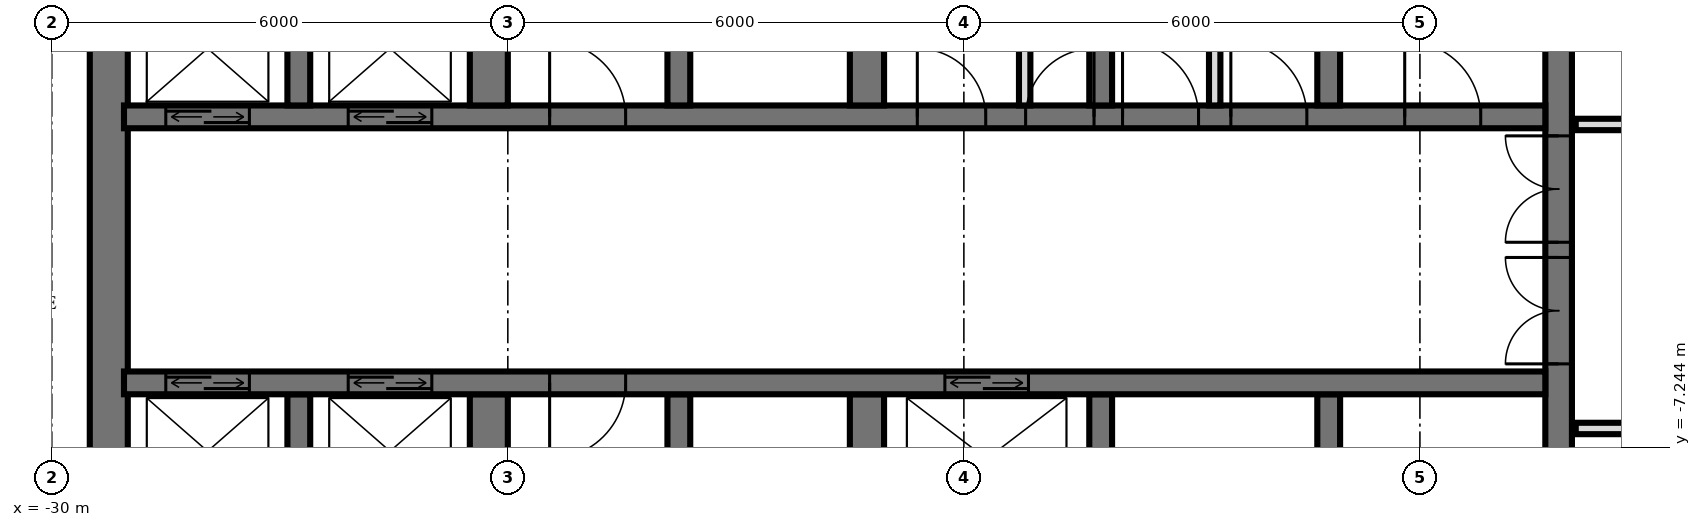
"""IFC4 building model, lengths in metres.
Left out: names, types, materials, properties, quantities, classifications, styles, units other than length and angle.
Written with IfcOpenShell. Run it as: python <this file> out.ifc"""

import sys

from ifc_helpers import new_model, si_unit, direction, frame, frame_2d, origin, place, context, subcontext, project, spatial, rectangle, extrude, element, fill, save


model = new_model("IFC4")
c1 = context("Model", 3, precision=1e-05, world=origin(), true_north=direction((0.0, 1.0)))
c2 = subcontext(c1, "Body", "Model", "MODEL_VIEW")
j1 = project(units=[si_unit("LENGTHUNIT", "METRE"), si_unit("PLANEANGLEUNIT", "RADIAN")], contexts=[c1])
p1 = place(None, origin())
s1 = spatial("IfcSite", under=j1, at=p1, CompositionType="ELEMENT")
p2 = place(p1, origin())
s2 = spatial("IfcBuilding", under=s1, at=p2, CompositionType="ELEMENT")
p3 = place(p2, frame((0.0, 0.0, 38.4)))
s3 = spatial("IfcBuildingStorey", under=s2, at=p3, CompositionType="ELEMENT", Elevation=38.4)
p4 = place(p3, frame((-10.175, -14.55, 0.0), z_axis=(0.0, 0.0, 1.0), x_axis=(0.0, 1.0, 0.0)))
e1 = element("IfcWall", 1, at=p4, inside=s3, PredefinedType="SHEAR", context=c2, shape_type="SweptSolid", body=[
    extrude(rectangle(XDim=14.1, YDim=0.35, at=frame_2d((7.05, 0.0))), origin(), (0.0, 0.0, 1.0), 3.6),
])
p5 = place(p4, frame((8.4, 0.0, 0.0)))
e2 = element("IfcOpeningElement", 2, at=p5, cuts=e1, PredefinedType="OPENING", context=c2, shape_type="SweptSolid", body=[
    extrude(rectangle(XDim=1.4, YDim=2.4, at=frame_2d((0.7, 1.2))), frame((0.0, 0.185, 0.0), z_axis=(0.0, -1.0, 0.0), x_axis=(1.0, 0.0, 0.0)), (0.0, 0.0, 1.0), 0.37),
])
p6 = place(p4, frame((10.0, 0.0, 0.0)))
e3 = element("IfcOpeningElement", 3, at=p6, cuts=e1, PredefinedType="OPENING", context=c2, shape_type="SweptSolid", body=[
    extrude(rectangle(XDim=1.4, YDim=2.4, at=frame_2d((0.7, 1.2))), frame((0.0, 0.185, 0.0), z_axis=(0.0, -1.0, 0.0), x_axis=(1.0, 0.0, 0.0)), (0.0, 0.0, 1.0), 0.37),
])
p7 = place(p4, frame((4.0, 0.0, 0.0)))
e4 = element("IfcOpeningElement", 4, at=p7, cuts=e1, PredefinedType="OPENING", context=c2, shape_type="SweptSolid", body=[
    extrude(rectangle(XDim=1.2, YDim=2.1, at=frame_2d((0.6, 1.05))), frame((0.0, 0.185, 0.0), z_axis=(0.0, -1.0, 0.0), x_axis=(1.0, 0.0, 0.0)), (0.0, 0.0, 1.0), 0.37),
])
p8 = place(p3, frame((-29.25, -14.55, 0.0), z_axis=(0.0, 0.0, 1.0), x_axis=(0.0, 1.0, 0.0)))
e5 = element("IfcWall", 5, at=p8, inside=s3, PredefinedType="SHEAR", context=c2, shape_type="SweptSolid", body=[
    extrude(rectangle(XDim=14.1, YDim=0.5, at=frame_2d((7.05, 0.0))), origin(), (0.0, 0.0, 1.0), 3.6),
])
p9 = place(p3, frame((-29.05, -2.9, 0.0), z_axis=(0.0, 0.0, 1.0), x_axis=(1.0, 0.0, 0.0)))
e6 = element("IfcWall", 6, at=p9, inside=s3, PredefinedType="SHEAR", context=c2, shape_type="SweptSolid", body=[
    extrude(rectangle(XDim=18.7, YDim=0.3, at=frame_2d((9.35, 0.0))), origin(), (0.0, 0.0, 1.0), 3.6),
])
p10 = place(p9, frame((2.95, 0.0, 0.0)))
e7 = element("IfcOpeningElement", 7, at=p10, cuts=e6, PredefinedType="OPENING", context=c2, shape_type="SweptSolid", body=[
    extrude(rectangle(XDim=1.1, YDim=2.1, at=frame_2d((0.55, 1.05))), frame((0.0, 0.16, 0.0), z_axis=(0.0, -1.0, 0.0), x_axis=(1.0, 0.0, 0.0)), (0.0, 0.0, 1.0), 0.32),
])
p11 = place(p9, frame((0.55, 0.0, 0.0)))
e8 = element("IfcOpeningElement", 8, at=p11, cuts=e6, PredefinedType="OPENING", context=c2, shape_type="SweptSolid", body=[
    extrude(rectangle(XDim=1.1, YDim=2.1, at=frame_2d((0.55, 1.05))), frame((0.0, 0.16, 0.0), z_axis=(0.0, -1.0, 0.0), x_axis=(1.0, 0.0, 0.0)), (0.0, 0.0, 1.0), 0.32),
])
p12 = place(p9, frame((11.863, 0.0, 0.0)))
e9 = element("IfcOpeningElement", 9, at=p12, cuts=e6, PredefinedType="OPENING", context=c2, shape_type="SweptSolid", body=[
    extrude(rectangle(XDim=0.9, YDim=2.1, at=frame_2d((0.45, 1.05))), frame((0.0, 0.16, 0.0), z_axis=(0.0, -1.0, 0.0), x_axis=(1.0, 0.0, 0.0)), (0.0, 0.0, 1.0), 0.32),
])
p13 = place(p9, frame((10.438, 0.0, 0.0)))
e10 = element("IfcOpeningElement", 10, at=p13, cuts=e6, PredefinedType="OPENING", context=c2, shape_type="SweptSolid", body=[
    extrude(rectangle(XDim=0.9, YDim=2.1, at=frame_2d((0.45, 1.05))), frame((0.0, 0.16, 0.0), z_axis=(0.0, -1.0, 0.0), x_axis=(1.0, 0.0, 0.0)), (0.0, 0.0, 1.0), 0.32),
])
p14 = place(p9, frame((16.85, 0.0, 0.0)))
e11 = element("IfcOpeningElement", 11, at=p14, cuts=e6, PredefinedType="OPENING", context=c2, shape_type="SweptSolid", body=[
    extrude(rectangle(XDim=1.0, YDim=2.1, at=frame_2d((0.5, 1.05))), frame((0.0, 0.16, 0.0), z_axis=(0.0, -1.0, 0.0), x_axis=(1.0, 0.0, 0.0)), (0.0, 0.0, 1.0), 0.32),
])
p15 = place(p9, frame((14.562, 0.0, 0.0)))
e12 = element("IfcOpeningElement", 12, at=p15, cuts=e6, PredefinedType="OPENING", context=c2, shape_type="SweptSolid", body=[
    extrude(rectangle(XDim=1.0, YDim=2.1, at=frame_2d((0.5, 1.05))), frame((0.0, 0.16, 0.0), z_axis=(0.0, -1.0, 0.0), x_axis=(1.0, 0.0, 0.0)), (0.0, 0.0, 1.0), 0.32),
])
p16 = place(p9, frame((13.137, 0.0, 0.0)))
e13 = element("IfcOpeningElement", 13, at=p16, cuts=e6, PredefinedType="OPENING", context=c2, shape_type="SweptSolid", body=[
    extrude(rectangle(XDim=1.0, YDim=2.1, at=frame_2d((0.5, 1.05))), frame((0.0, 0.16, 0.0), z_axis=(0.0, -1.0, 0.0), x_axis=(1.0, 0.0, 0.0)), (0.0, 0.0, 1.0), 0.32),
])
p17 = place(p9, frame((5.6, 0.0, 0.0)))
e14 = element("IfcOpeningElement", 14, at=p17, cuts=e6, PredefinedType="OPENING", context=c2, shape_type="SweptSolid", body=[
    extrude(rectangle(XDim=1.0, YDim=2.1, at=frame_2d((0.5, 1.05))), frame((0.0, 0.16, 0.0), z_axis=(0.0, -1.0, 0.0), x_axis=(1.0, 0.0, 0.0)), (0.0, 0.0, 1.0), 0.32),
])
p18 = place(p3, frame((-29.05, -6.4, 0.0), z_axis=(0.0, 0.0, 1.0), x_axis=(1.0, 0.0, 0.0)))
e15 = element("IfcWall", 15, at=p18, inside=s3, PredefinedType="SHEAR", context=c2, shape_type="SweptSolid", body=[
    extrude(rectangle(XDim=18.7, YDim=0.3, at=frame_2d((9.35, 0.0))), origin(), (0.0, 0.0, 1.0), 3.6),
])
p19 = place(p18, frame((2.95, 0.0, 0.0)))
e16 = element("IfcOpeningElement", 16, at=p19, cuts=e15, PredefinedType="OPENING", context=c2, shape_type="SweptSolid", body=[
    extrude(rectangle(XDim=1.1, YDim=2.1, at=frame_2d((0.55, 1.05))), frame((0.0, 0.16, 0.0), z_axis=(0.0, -1.0, 0.0), x_axis=(1.0, 0.0, 0.0)), (0.0, 0.0, 1.0), 0.32),
])
p20 = place(p18, frame((0.55, 0.0, 0.0)))
e17 = element("IfcOpeningElement", 17, at=p20, cuts=e15, PredefinedType="OPENING", context=c2, shape_type="SweptSolid", body=[
    extrude(rectangle(XDim=1.1, YDim=2.1, at=frame_2d((0.55, 1.05))), frame((0.0, 0.16, 0.0), z_axis=(0.0, -1.0, 0.0), x_axis=(1.0, 0.0, 0.0)), (0.0, 0.0, 1.0), 0.32),
])
p21 = place(p18, frame((10.8, 0.0, 0.0)))
e18 = element("IfcOpeningElement", 18, at=p21, cuts=e15, PredefinedType="OPENING", context=c2, shape_type="SweptSolid", body=[
    extrude(rectangle(XDim=1.1, YDim=2.1, at=frame_2d((0.55, 1.05))), frame((0.0, 0.16, 0.0), z_axis=(0.0, -1.0, 0.0), x_axis=(1.0, 0.0, 0.0)), (0.0, 0.0, 1.0), 0.32),
])
p22 = place(p18, frame((5.6, 0.0, 0.0)))
e19 = element("IfcOpeningElement", 19, at=p22, cuts=e15, PredefinedType="OPENING", context=c2, shape_type="SweptSolid", body=[
    extrude(rectangle(XDim=1.0, YDim=2.1, at=frame_2d((0.5, 1.05))), frame((0.0, 0.16, 0.0), z_axis=(0.0, -1.0, 0.0), x_axis=(1.0, 0.0, 0.0)), (0.0, 0.0, 1.0), 0.32),
])
for number, where, z_axis, x_axis in (
    (20, (-13.2, -2.75, 0.0), (0.0, 0.0, 1.0), (0.0, 1.0, 0.0)),
    (21, (-13.2, -8.85, 0.0), (0.0, 0.0, 1.0), (0.0, 1.0, 0.0)),
    (22, (-16.2, -2.75, 0.0), (0.0, 0.0, 1.0), (0.0, 1.0, 0.0)),
    (23, (-16.2, -8.85, 0.0), (0.0, 0.0, 1.0), (0.0, 1.0, 0.0)),
):
    element("IfcWall", number, at=place(p3, frame(where, z_axis=z_axis, x_axis=x_axis)), inside=s3, PredefinedType="SHEAR", context=c2, shape_type="SweptSolid", body=[
        extrude(rectangle(XDim=2.3, YDim=0.3, at=frame_2d((1.15, 0.0))), origin(), (0.0, 0.0, 1.0), 3.6),
    ])
for number, where, z_axis, x_axis in (
    (24, (-19.275, -2.75, 0.0), (0.0, 0.0, 1.0), (0.0, 1.0, 0.0)),
    (25, (-19.275, -8.85, 0.0), (0.0, 0.0, 1.0), (0.0, 1.0, 0.0)),
):
    element("IfcWall", number, at=place(p3, frame(where, z_axis=z_axis, x_axis=x_axis)), inside=s3, PredefinedType="SHEAR", context=c2, shape_type="SweptSolid", body=[
        extrude(rectangle(XDim=2.3, YDim=0.45, at=frame_2d((1.15, 0.0))), origin(), (0.0, 0.0, 1.0), 3.6),
    ])
for number, where, z_axis, x_axis in (
    (26, (-21.75, -2.75, 0.0), (0.0, 0.0, 1.0), (0.0, 1.0, 0.0)),
    (27, (-21.75, -8.85, 0.0), (0.0, 0.0, 1.0), (0.0, 1.0, 0.0)),
):
    element("IfcWall", number, at=place(p3, frame(where, z_axis=z_axis, x_axis=x_axis)), inside=s3, PredefinedType="SHEAR", context=c2, shape_type="SweptSolid", body=[
        extrude(rectangle(XDim=2.3, YDim=0.3, at=frame_2d((1.15, 0.0))), origin(), (0.0, 0.0, 1.0), 3.6),
    ])
for number, where, z_axis, x_axis in (
    (28, (-24.25, -2.75, 0.0), (0.0, 0.0, 1.0), (0.0, 1.0, 0.0)),
    (29, (-24.25, -8.85, 0.0), (0.0, 0.0, 1.0), (0.0, 1.0, 0.0)),
):
    element("IfcWall", number, at=place(p3, frame(where, z_axis=z_axis, x_axis=x_axis)), inside=s3, PredefinedType="SHEAR", context=c2, shape_type="SweptSolid", body=[
        extrude(rectangle(XDim=2.3, YDim=0.5, at=frame_2d((1.15, 0.0))), origin(), (0.0, 0.0, 1.0), 3.6),
    ])
for number, where, z_axis, x_axis in (
    (30, (-26.75, -2.75, 0.0), (0.0, 0.0, 1.0), (0.0, 1.0, 0.0)),
    (31, (-26.75, -8.85, 0.0), (0.0, 0.0, 1.0), (0.0, 1.0, 0.0)),
):
    element("IfcWall", number, at=place(p3, frame(where, z_axis=z_axis, x_axis=x_axis)), inside=s3, PredefinedType="SHEAR", context=c2, shape_type="SweptSolid", body=[
        extrude(rectangle(XDim=2.3, YDim=0.3, at=frame_2d((1.15, 0.0))), origin(), (0.0, 0.0, 1.0), 3.6),
    ])
for number, where, z_axis, x_axis in (
    (32, (-17.2, -2.75, 0.0), (0.0, 0.0, 1.0), (0.0, 1.0, 0.0)),
    (33, (-14.7, -2.75, 0.0), (0.0, 0.0, 1.0), (0.0, 1.0, 0.0)),
):
    element("IfcWall", number, at=place(p3, frame(where, z_axis=z_axis, x_axis=x_axis)), inside=s3, PredefinedType="PARTITIONING", context=c2, shape_type="SweptSolid", body=[
        extrude(rectangle(XDim=2.3, YDim=0.15, at=frame_2d((1.15, 0.0))), origin(), (0.0, 0.0, 1.0), 3.3),
    ])
p23 = place(p3, frame((-9.95, -7.0, 0.0), z_axis=(0.0, 0.0, 1.0), x_axis=(1.0, 0.0, 0.0)))
e34 = element("IfcWall", 34, at=p23, inside=s3, PredefinedType="PARTITIONING", context=c2, shape_type="SweptSolid", body=[
    extrude(rectangle(XDim=19.9, YDim=0.15, at=frame_2d((9.95, 0.0))), origin(), (0.0, 0.0, 1.0), 3.32),
])
p24 = place(p23, frame((9.45, 0.0, 0.0)))
e35 = element("IfcOpeningElement", 35, at=p24, cuts=e34, PredefinedType="OPENING", context=c2, shape_type="SweptSolid", body=[
    extrude(rectangle(XDim=1.0, YDim=2.1, at=frame_2d((0.5, 1.05))), frame((0.0, 0.085, 0.0), z_axis=(0.0, -1.0, 0.0), x_axis=(1.0, 0.0, 0.0)), (0.0, 0.0, 1.0), 0.17),
])
p25 = place(p23, frame((15.45, 0.0, 0.0)))
e36 = element("IfcOpeningElement", 36, at=p25, cuts=e34, PredefinedType="OPENING", context=c2, shape_type="SweptSolid", body=[
    extrude(rectangle(XDim=1.0, YDim=2.1, at=frame_2d((0.5, 1.05))), frame((0.0, 0.085, 0.0), z_axis=(0.0, -1.0, 0.0), x_axis=(1.0, 0.0, 0.0)), (0.0, 0.0, 1.0), 0.17),
])
p26 = place(p3, frame((-9.95, -3.0, 0.0), z_axis=(0.0, 0.0, 1.0), x_axis=(1.0, 0.0, 0.0)))
e37 = element("IfcWall", 37, at=p26, inside=s3, PredefinedType="PARTITIONING", context=c2, shape_type="SweptSolid", body=[
    extrude(rectangle(XDim=19.9, YDim=0.15, at=frame_2d((9.95, 0.0))), origin(), (0.0, 0.0, 1.0), 3.32),
])
p27 = place(p26, frame((1.7, 0.0, 0.0)))
e38 = element("IfcOpeningElement", 38, at=p27, cuts=e37, PredefinedType="OPENING", context=c2, shape_type="SweptSolid", body=[
    extrude(rectangle(XDim=1.0, YDim=2.1, at=frame_2d((0.5, 1.05))), frame((0.0, 0.085, 0.0), z_axis=(0.0, -1.0, 0.0), x_axis=(1.0, 0.0, 0.0)), (0.0, 0.0, 1.0), 0.17),
])
p28 = place(p26, frame((5.45, 0.0, 0.0)))
e39 = element("IfcOpeningElement", 39, at=p28, cuts=e37, PredefinedType="OPENING", context=c2, shape_type="SweptSolid", body=[
    extrude(rectangle(XDim=1.0, YDim=2.1, at=frame_2d((0.5, 1.05))), frame((0.0, 0.085, 0.0), z_axis=(0.0, -1.0, 0.0), x_axis=(1.0, 0.0, 0.0)), (0.0, 0.0, 1.0), 0.17),
])
p29 = place(p26, frame((8.2, 0.0, 0.0)))
e40 = element("IfcOpeningElement", 40, at=p29, cuts=e37, PredefinedType="OPENING", context=c2, shape_type="SweptSolid", body=[
    extrude(rectangle(XDim=1.0, YDim=2.1, at=frame_2d((0.5, 1.05))), frame((0.0, 0.085, 0.0), z_axis=(0.0, -1.0, 0.0), x_axis=(1.0, 0.0, 0.0)), (0.0, 0.0, 1.0), 0.17),
])
p30 = place(p26, frame((11.95, 0.0, 0.0)))
e41 = element("IfcOpeningElement", 41, at=p30, cuts=e37, PredefinedType="OPENING", context=c2, shape_type="SweptSolid", body=[
    extrude(rectangle(XDim=1.0, YDim=2.1, at=frame_2d((0.5, 1.05))), frame((0.0, 0.085, 0.0), z_axis=(0.0, -1.0, 0.0), x_axis=(1.0, 0.0, 0.0)), (0.0, 0.0, 1.0), 0.17),
])
p31 = place(p26, frame((16.95, 0.0, 0.0)))
e42 = element("IfcOpeningElement", 42, at=p31, cuts=e37, PredefinedType="OPENING", context=c2, shape_type="SweptSolid", body=[
    extrude(rectangle(XDim=1.0, YDim=2.1, at=frame_2d((0.5, 1.05))), frame((0.0, 0.085, 0.0), z_axis=(0.0, -1.0, 0.0), x_axis=(1.0, 0.0, 0.0)), (0.0, 0.0, 1.0), 0.17),
])
p32 = place(p10, origin())
e43 = element("IfcDoor", 43, at=p32, inside=s3, OperationType="DOUBLE_DOOR_SLIDING", PredefinedType="USERDEFINED", context=c2, shape_type="SweptSolid", body=[
    extrude(rectangle(XDim=1.1, YDim=2.1, at=frame_2d((0.55, 1.05))), frame((0.0, 0.025, 0.0), z_axis=(0.0, -1.0, 0.0), x_axis=(1.0, 0.0, 0.0)), (0.0, 0.0, 1.0), 0.05),
])
fill(e7, e43)
p33 = place(p11, origin())
e44 = element("IfcDoor", 44, at=p33, inside=s3, OperationType="DOUBLE_DOOR_SLIDING", PredefinedType="USERDEFINED", context=c2, shape_type="SweptSolid", body=[
    extrude(rectangle(XDim=1.1, YDim=2.1, at=frame_2d((0.55, 1.05))), frame((0.0, 0.025, 0.0), z_axis=(0.0, -1.0, 0.0), x_axis=(1.0, 0.0, 0.0)), (0.0, 0.0, 1.0), 0.05),
])
fill(e8, e44)
p34 = place(p19, origin())
e45 = element("IfcDoor", 45, at=p34, inside=s3, OperationType="DOUBLE_DOOR_SLIDING", PredefinedType="USERDEFINED", context=c2, shape_type="SweptSolid", body=[
    extrude(rectangle(XDim=1.1, YDim=2.1, at=frame_2d((0.55, 1.05))), frame((0.0, 0.025, 0.0), z_axis=(0.0, -1.0, 0.0), x_axis=(1.0, 0.0, 0.0)), (0.0, 0.0, 1.0), 0.05),
])
fill(e16, e45)
p35 = place(p20, origin())
e46 = element("IfcDoor", 46, at=p35, inside=s3, OperationType="DOUBLE_DOOR_SLIDING", PredefinedType="USERDEFINED", context=c2, shape_type="SweptSolid", body=[
    extrude(rectangle(XDim=1.1, YDim=2.1, at=frame_2d((0.55, 1.05))), frame((0.0, 0.025, 0.0), z_axis=(0.0, -1.0, 0.0), x_axis=(1.0, 0.0, 0.0)), (0.0, 0.0, 1.0), 0.05),
])
fill(e17, e46)
p36 = place(p21, origin())
e47 = element("IfcDoor", 47, at=p36, inside=s3, OperationType="DOUBLE_DOOR_SLIDING", PredefinedType="USERDEFINED", context=c2, shape_type="SweptSolid", body=[
    extrude(rectangle(XDim=1.1, YDim=2.1, at=frame_2d((0.55, 1.05))), frame((0.0, 0.025, 0.0), z_axis=(0.0, -1.0, 0.0), x_axis=(1.0, 0.0, 0.0)), (0.0, 0.0, 1.0), 0.05),
])
fill(e18, e47)
p37 = place(p5, origin())
e48 = element("IfcDoor", 48, at=p37, inside=s3, OperationType="DOUBLE_DOOR_SINGLE_SWING", PredefinedType="DOOR", context=c2, shape_type="SweptSolid", body=[
    extrude(rectangle(XDim=1.4, YDim=2.4, at=frame_2d((0.7, 1.2))), frame((0.0, 0.025, 0.0), z_axis=(0.0, -1.0, 0.0), x_axis=(1.0, 0.0, 0.0)), (0.0, 0.0, 1.0), 0.05),
])
fill(e2, e48)
p38 = place(p6, origin())
e49 = element("IfcDoor", 49, at=p38, inside=s3, OperationType="DOUBLE_DOOR_SINGLE_SWING", PredefinedType="DOOR", context=c2, shape_type="SweptSolid", body=[
    extrude(rectangle(XDim=1.4, YDim=2.4, at=frame_2d((0.7, 1.2))), frame((0.0, 0.025, 0.0), z_axis=(0.0, -1.0, 0.0), x_axis=(1.0, 0.0, 0.0)), (0.0, 0.0, 1.0), 0.05),
])
fill(e3, e49)
p39 = place(p12, origin())
e50 = element("IfcDoor", 50, at=p39, inside=s3, OperationType="SINGLE_SWING_LEFT", PredefinedType="DOOR", context=c2, shape_type="SweptSolid", body=[
    extrude(rectangle(XDim=0.9, YDim=2.1, at=frame_2d((0.45, 1.05))), frame((0.0, 0.025, 0.0), z_axis=(0.0, -1.0, 0.0), x_axis=(1.0, 0.0, 0.0)), (0.0, 0.0, 1.0), 0.05),
])
fill(e9, e50)
p40 = place(p13, origin())
e51 = element("IfcDoor", 51, at=p40, inside=s3, OperationType="SINGLE_SWING_RIGHT", PredefinedType="DOOR", context=c2, shape_type="SweptSolid", body=[
    extrude(rectangle(XDim=0.9, YDim=2.1, at=frame_2d((0.45, 1.05))), frame((0.0, 0.025, 0.0), z_axis=(0.0, -1.0, 0.0), x_axis=(1.0, 0.0, 0.0)), (0.0, 0.0, 1.0), 0.05),
])
fill(e10, e51)
p41 = place(p14, origin())
e52 = element("IfcDoor", 52, at=p41, inside=s3, OperationType="SINGLE_SWING_RIGHT", PredefinedType="DOOR", context=c2, shape_type="SweptSolid", body=[
    extrude(rectangle(XDim=1.0, YDim=2.1, at=frame_2d((0.5, 1.05))), frame((0.0, 0.025, 0.0), z_axis=(0.0, -1.0, 0.0), x_axis=(1.0, 0.0, 0.0)), (0.0, 0.0, 1.0), 0.05),
])
fill(e11, e52)
p42 = place(p15, origin())
e53 = element("IfcDoor", 53, at=p42, inside=s3, OperationType="SINGLE_SWING_RIGHT", PredefinedType="DOOR", context=c2, shape_type="SweptSolid", body=[
    extrude(rectangle(XDim=1.0, YDim=2.1, at=frame_2d((0.5, 1.05))), frame((0.0, 0.025, 0.0), z_axis=(0.0, -1.0, 0.0), x_axis=(1.0, 0.0, 0.0)), (0.0, 0.0, 1.0), 0.05),
])
fill(e12, e53)
p43 = place(p16, origin())
e54 = element("IfcDoor", 54, at=p43, inside=s3, OperationType="SINGLE_SWING_RIGHT", PredefinedType="DOOR", context=c2, shape_type="SweptSolid", body=[
    extrude(rectangle(XDim=1.0, YDim=2.1, at=frame_2d((0.5, 1.05))), frame((0.0, 0.025, 0.0), z_axis=(0.0, -1.0, 0.0), x_axis=(1.0, 0.0, 0.0)), (0.0, 0.0, 1.0), 0.05),
])
fill(e13, e54)
p44 = place(p17, origin())
e55 = element("IfcDoor", 55, at=p44, inside=s3, OperationType="SINGLE_SWING_RIGHT", PredefinedType="DOOR", context=c2, shape_type="SweptSolid", body=[
    extrude(rectangle(XDim=1.0, YDim=2.1, at=frame_2d((0.5, 1.05))), frame((0.0, 0.025, 0.0), z_axis=(0.0, -1.0, 0.0), x_axis=(1.0, 0.0, 0.0)), (0.0, 0.0, 1.0), 0.05),
])
fill(e14, e55)
p45 = place(p22, frame((0.5, 0.0, 0.0), z_axis=(0.0, 0.0, 1.0), x_axis=(-1.0, 0.0, 0.0)))
e56 = element("IfcDoor", 56, at=p45, inside=s3, OperationType="SINGLE_SWING_LEFT", PredefinedType="DOOR", context=c2, shape_type="SweptSolid", body=[
    extrude(rectangle(XDim=1.0, YDim=2.1, at=frame_2d((0.0, 1.05))), frame((0.0, -0.025, 0.0), z_axis=(0.0, 1.0, 0.0), x_axis=(-1.0, 0.0, 0.0)), (0.0, 0.0, 1.0), 0.05),
])
fill(e19, e56)
save(model, sys.argv[1])
